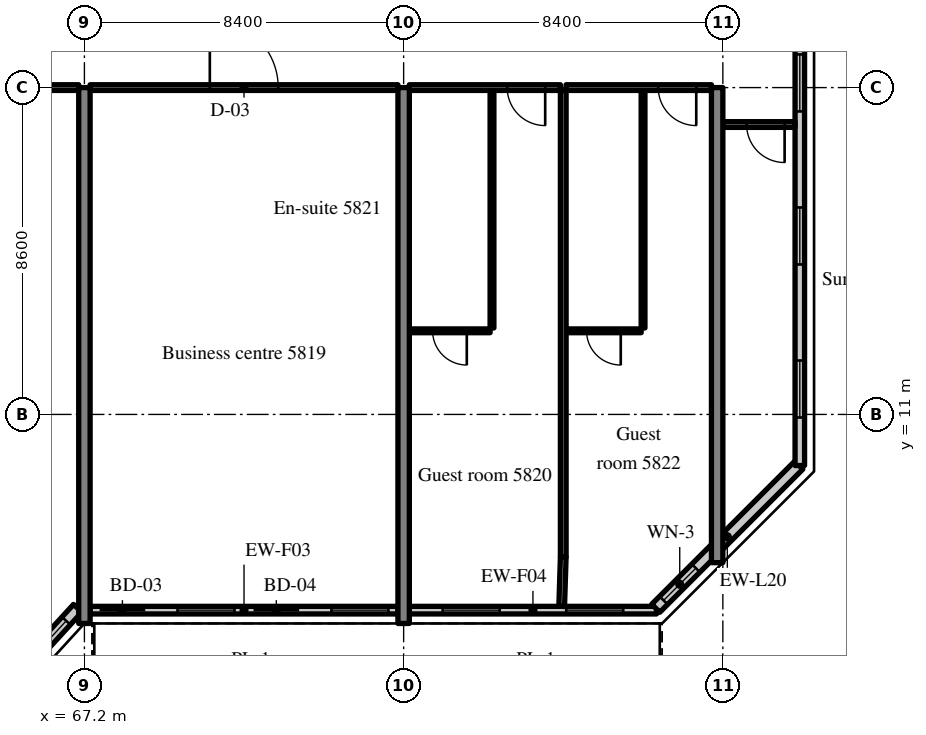
"""IFC4 building model, lengths in metres.
Left out: names, types, materials, properties, quantities, classifications, styles, units other than length and angle.
Written with IfcOpenShell. Run it as: python <this file> out.ifc"""

import sys

from ifc_helpers import new_model, si_unit, direction, frame, frame_2d, origin, place, context, subcontext, project, spatial, rectangle, extrude, source, transform, mapped, element, fill, save


model = new_model("IFC4")
c1 = context("Model", 3, precision=1e-05, world=origin(), true_north=direction((0.0, 1.0)))
c2 = subcontext(c1, "Body", "Model", "MODEL_VIEW")
j1 = project(units=[si_unit("LENGTHUNIT", "METRE"), si_unit("PLANEANGLEUNIT", "RADIAN")], contexts=[c1])
p1 = place(None, origin())
s1 = spatial("IfcSite", under=j1, at=p1, CompositionType="ELEMENT")
p2 = place(p1, origin())
s2 = spatial("IfcBuilding", under=s1, at=p2, CompositionType="ELEMENT")
p3 = place(p2, frame((0.0, 0.0, 241.3)))
s3 = spatial("IfcBuildingStorey", under=s2, at=p3, CompositionType="ELEMENT", Elevation=241.3)
m1 = source(origin(), c2, "Body", "SweptSolid", [
    extrude(rectangle(XDim=14.1, YDim=0.3, at=frame_2d((7.05, 0.0))), origin(), (0.0, 0.0, 1.0), 3.62),
])
for number, where, z_axis, x_axis in (
    (1, (67.2, 5.5, 0.0), (0.0, 0.0, 1.0), (0.0, 1.0, 0.0)),
    (2, (75.6, 5.5, 0.0), (0.0, 0.0, 1.0), (0.0, 1.0, 0.0)),
):
    element("IfcWall", number, at=place(p3, frame(where, z_axis=z_axis, x_axis=x_axis)), inside=s3, PredefinedType="SHEAR", context=c2, shape_type="MappedRepresentation", body=[
        mapped(m1, transform((0.0, 0.0, 0.0), scale=1.0)),
    ])
m2 = source(origin(), c2, "Body", "SweptSolid", [
    extrude(rectangle(XDim=12.5, YDim=0.3, at=frame_2d((6.25, 0.0))), origin(), (0.0, 0.0, 1.0), 3.62),
])
p4 = place(p3, frame((83.85, 7.1, 0.0), z_axis=(0.0, 0.0, 1.0), x_axis=(0.0, 1.0, 0.0)))
e3 = element("IfcWall", 3, at=p4, inside=s3, PredefinedType="SHEAR", context=c2, shape_type="MappedRepresentation", body=[
    mapped(m2, transform((0.0, 0.0, 0.0), scale=1.0)),
])
m3 = source(origin(), c2, "Body", "SweptSolid", [
    extrude(rectangle(XDim=2.398, YDim=0.3, at=frame_2d((1.199, 0.0))), origin(), (0.0, 0.0, 1.0), 3.62),
])
p5 = place(p3, frame((65.404, 4.131, 0.0), z_axis=(0.0, 0.0, 1.0), x_axis=(0.675374189419, 0.737475222815, 0.0)))
e4 = element("IfcWall", 4, at=p5, inside=s3, PredefinedType="SOLIDWALL", context=c2, shape_type="MappedRepresentation", body=[
    mapped(m3, transform((0.0, 0.0, 0.0), scale=1.0)),
])
m4 = source(origin(), c2, "Body", "SweptSolid", [
    extrude(rectangle(XDim=1.5, YDim=2.0, at=frame_2d((0.75, 1.0))), frame((0.0, 0.16, 0.0), z_axis=(0.0, -1.0, 0.0), x_axis=(1.0, 0.0, 0.0)), (0.0, 0.0, 1.0), 0.32),
])
p6 = place(p5, frame((0.449, 0.0, 0.9)))
e5 = element("IfcOpeningElement", 5, at=p6, cuts=e4, PredefinedType="OPENING", context=c2, shape_type="MappedRepresentation", body=[
    mapped(m4, transform((0.0, 0.0, 0.0), scale=1.0)),
])
m5 = source(origin(), c2, "Body", "SweptSolid", [
    extrude(rectangle(XDim=8.1, YDim=0.2, at=frame_2d((4.05, 0.0))), origin(), (0.0, 0.0, 1.0), 3.02),
])
p7 = place(p3, frame((67.35, 5.85, 0.0), z_axis=(0.0, 0.0, 1.0), x_axis=(1.0, 0.0, 0.0)))
e6 = element("IfcWall", 6, at=p7, inside=s3, PredefinedType="SOLIDWALL", context=c2, shape_type="MappedRepresentation", body=[
    mapped(m5, transform((0.0, 0.0, 0.0), scale=1.0)),
])
m6 = source(origin(), c2, "Body", "SweptSolid", [
    extrude(rectangle(XDim=1.2, YDim=2.4, at=frame_2d((0.6, 1.2))), frame((0.0, 0.11, 0.0), z_axis=(0.0, -1.0, 0.0), x_axis=(1.0, 0.0, 0.0)), (0.0, 0.0, 1.0), 0.22),
])
p8 = place(p7, frame((0.25, 0.0, 0.0)))
e7 = element("IfcOpeningElement", 7, at=p8, cuts=e6, PredefinedType="OPENING", context=c2, shape_type="MappedRepresentation", body=[
    mapped(m6, transform((0.0, 0.0, 0.0), scale=1.0)),
])
m7 = source(origin(), c2, "Body", "SweptSolid", [
    extrude(rectangle(XDim=1.5, YDim=1.5, at=frame_2d((0.75, 0.75))), frame((0.0, 0.11, 0.0), z_axis=(0.0, -1.0, 0.0), x_axis=(1.0, 0.0, 0.0)), (0.0, 0.0, 1.0), 0.22),
])
p9 = place(p7, frame((2.3, 0.0, 0.9)))
e8 = element("IfcOpeningElement", 8, at=p9, cuts=e6, PredefinedType="OPENING", context=c2, shape_type="MappedRepresentation", body=[
    mapped(m7, transform((0.0, 0.0, 0.0), scale=1.0)),
])
p10 = place(p7, frame((4.3, 0.0, 0.0)))
e9 = element("IfcOpeningElement", 9, at=p10, cuts=e6, PredefinedType="OPENING", context=c2, shape_type="MappedRepresentation", body=[
    mapped(m6, transform((0.0, 0.0, 0.0), scale=1.0)),
])
p11 = place(p7, frame((6.35, 0.0, 0.9)))
e10 = element("IfcOpeningElement", 10, at=p11, cuts=e6, PredefinedType="OPENING", context=c2, shape_type="MappedRepresentation", body=[
    mapped(m7, transform((0.0, 0.0, 0.0), scale=1.0)),
])
m8 = source(origin(), c2, "Body", "SweptSolid", [
    extrude(rectangle(XDim=6.505, YDim=0.2, at=frame_2d((3.252, 0.0))), origin(), (0.0, 0.0, 1.0), 3.02),
])
p12 = place(p3, frame((75.75, 5.85, 0.0), z_axis=(0.0, 0.0, 1.0), x_axis=(1.0, 0.0, 0.0)))
e11 = element("IfcWall", 11, at=p12, inside=s3, PredefinedType="SOLIDWALL", context=c2, shape_type="MappedRepresentation", body=[
    mapped(m8, transform((0.0, 0.0, 0.0), scale=1.0)),
])
p13 = place(p12, frame((0.876, 0.0, 0.9)))
e12 = element("IfcOpeningElement", 12, at=p13, cuts=e11, PredefinedType="OPENING", context=c2, shape_type="MappedRepresentation", body=[
    mapped(m7, transform((0.0, 0.0, 0.0), scale=1.0)),
])
p14 = place(p12, frame((4.129, 0.0, 0.9)))
e13 = element("IfcOpeningElement", 13, at=p14, cuts=e11, PredefinedType="OPENING", context=c2, shape_type="MappedRepresentation", body=[
    mapped(m7, transform((0.0, 0.0, 0.0), scale=1.0)),
])
m9 = source(origin(), c2, "Body", "SweptSolid", [
    extrude(rectangle(XDim=5.326, YDim=0.3, at=frame_2d((2.663, 0.0))), origin(), (0.0, 0.0, 1.0), 3.62),
])
p15 = place(p3, frame((82.234, 5.9, 0.0), z_axis=(0.0, 0.0, 1.0), x_axis=(0.707083859269, 0.707129702361, 0.0)))
e14 = element("IfcWall", 14, at=p15, inside=s3, PredefinedType="SOLIDWALL", context=c2, shape_type="MappedRepresentation", body=[
    mapped(m9, transform((0.0, 0.0, 0.0), scale=1.0)),
])
m10 = source(origin(), c2, "Body", "SweptSolid", [
    extrude(rectangle(XDim=1.2, YDim=1.5, at=frame_2d((0.6, 0.75))), frame((0.0, 0.16, 0.0), z_axis=(0.0, -1.0, 0.0), x_axis=(1.0, 0.0, 0.0)), (0.0, 0.0, 1.0), 0.32),
])
p16 = place(p15, frame((0.292, 0.0, 0.9)))
e15 = element("IfcOpeningElement", 15, at=p16, cuts=e14, PredefinedType="OPENING", context=c2, shape_type="MappedRepresentation", body=[
    mapped(m10, transform((0.0, 0.0, 0.0), scale=1.0)),
])
m11 = source(origin(), c2, "Body", "SweptSolid", [
    extrude(rectangle(XDim=28.189, YDim=0.25, at=frame_2d((14.095, 0.0))), origin(), (0.0, 0.0, 1.0), 3.62),
])
p17 = place(p3, frame((86.025, 9.655, 0.0), z_axis=(0.0, 0.0, 1.0), x_axis=(0.0, 1.0, 0.0)))
e16 = element("IfcWall", 16, at=p17, inside=s3, PredefinedType="SOLIDWALL", context=c2, shape_type="MappedRepresentation", body=[
    mapped(m11, transform((0.0, 0.0, 0.0), scale=1.0)),
])
m12 = source(origin(), c2, "Body", "SweptSolid", [
    extrude(rectangle(XDim=1.5, YDim=1.5, at=frame_2d((0.75, 0.75))), frame((0.0, 0.135, 0.0), z_axis=(0.0, -1.0, 0.0), x_axis=(1.0, 0.0, 0.0)), (0.0, 0.0, 1.0), 0.27),
])
p18 = place(p17, frame((1.263, 0.0, 0.9)))
e17 = element("IfcOpeningElement", 17, at=p18, cuts=e16, PredefinedType="OPENING", context=c2, shape_type="MappedRepresentation", body=[
    mapped(m12, transform((0.0, 0.0, 0.0), scale=1.0)),
])
p19 = place(p17, frame((5.291, 0.0, 0.9)))
e18 = element("IfcOpeningElement", 18, at=p19, cuts=e16, PredefinedType="OPENING", context=c2, shape_type="MappedRepresentation", body=[
    mapped(m12, transform((0.0, 0.0, 0.0), scale=1.0)),
])
p20 = place(p17, frame((9.318, 0.0, 0.9)))
e19 = element("IfcOpeningElement", 19, at=p20, cuts=e16, PredefinedType="OPENING", context=c2, shape_type="MappedRepresentation", body=[
    mapped(m12, transform((0.0, 0.0, 0.0), scale=1.0)),
])
p21 = place(p17, frame((13.345, 0.0, 0.9)))
e20 = element("IfcOpeningElement", 20, at=p21, cuts=e16, PredefinedType="OPENING", context=c2, shape_type="MappedRepresentation", body=[
    mapped(m12, transform((0.0, 0.0, 0.0), scale=1.0)),
])
p22 = place(p17, frame((17.372, 0.0, 0.9)))
e21 = element("IfcOpeningElement", 21, at=p22, cuts=e16, PredefinedType="OPENING", context=c2, shape_type="MappedRepresentation", body=[
    mapped(m12, transform((0.0, 0.0, 0.0), scale=1.0)),
])
p23 = place(p17, frame((21.399, 0.0, 0.9)))
e22 = element("IfcOpeningElement", 22, at=p23, cuts=e16, PredefinedType="OPENING", context=c2, shape_type="MappedRepresentation", body=[
    mapped(m12, transform((0.0, 0.0, 0.0), scale=1.0)),
])
p24 = place(p17, frame((25.426, 0.0, 0.9)))
e23 = element("IfcOpeningElement", 23, at=p24, cuts=e16, PredefinedType="OPENING", context=c2, shape_type="MappedRepresentation", body=[
    mapped(m12, transform((0.0, 0.0, 0.0), scale=1.0)),
])
m13 = source(origin(), c2, "Body", "SweptSolid", [
    extrude(rectangle(XDim=3.975, YDim=0.15, at=frame_2d((1.988, 0.0))), origin(), (0.0, 0.0, 1.0), 2.92),
])
p25 = place(p3, frame((63.075, 19.6, 0.0), z_axis=(0.0, 0.0, 1.0), x_axis=(1.0, 0.0, 0.0)))
e24 = element("IfcWall", 24, at=p25, inside=s3, PredefinedType="PARTITIONING", context=c2, shape_type="MappedRepresentation", body=[
    mapped(m13, transform((0.0, 0.0, 0.0), scale=1.0)),
])
m14 = source(origin(), c2, "Body", "SweptSolid", [
    extrude(rectangle(XDim=1.0, YDim=2.1, at=frame_2d((0.5, 1.05))), frame((0.0, 0.085, 0.0), z_axis=(0.0, -1.0, 0.0), x_axis=(1.0, 0.0, 0.0)), (0.0, 0.0, 1.0), 0.17),
])
p26 = place(p25, frame((1.487, 0.0, 0.0)))
e25 = element("IfcOpeningElement", 25, at=p26, cuts=e24, PredefinedType="OPENING", context=c2, shape_type="MappedRepresentation", body=[
    mapped(m14, transform((0.0, 0.0, 0.0), scale=1.0)),
])
m15 = source(origin(), c2, "Body", "SweptSolid", [
    extrude(rectangle(XDim=8.1, YDim=0.15, at=frame_2d((4.05, 0.0))), origin(), (0.0, 0.0, 1.0), 2.92),
])
p27 = place(p3, frame((67.35, 19.6, 0.0), z_axis=(0.0, 0.0, 1.0), x_axis=(1.0, 0.0, 0.0)))
e26 = element("IfcWall", 26, at=p27, inside=s3, PredefinedType="PARTITIONING", context=c2, shape_type="MappedRepresentation", body=[
    mapped(m15, transform((0.0, 0.0, 0.0), scale=1.0)),
])
m16 = source(origin(), c2, "Body", "SweptSolid", [
    extrude(rectangle(XDim=1.8, YDim=2.1, at=frame_2d((0.9, 1.05))), frame((0.0, 0.085, 0.0), z_axis=(0.0, -1.0, 0.0), x_axis=(1.0, 0.0, 0.0)), (0.0, 0.0, 1.0), 0.17),
])
p28 = place(p27, frame((3.15, 0.0, 0.0)))
e27 = element("IfcOpeningElement", 27, at=p28, cuts=e26, PredefinedType="OPENING", context=c2, shape_type="MappedRepresentation", body=[
    mapped(m16, transform((0.0, 0.0, 0.0), scale=1.0)),
])
m17 = source(origin(), c2, "Body", "SweptSolid", [
    extrude(rectangle(XDim=6.25, YDim=0.1, at=frame_2d((3.125, 0.0))), origin(), (0.0, 0.0, 1.0), 3.62),
])
p29 = place(p3, frame((77.925, 13.275, 0.0), z_axis=(0.0, 0.0, 1.0), x_axis=(0.0, 1.0, 0.0)))
e28 = element("IfcWall", 28, at=p29, inside=s3, PredefinedType="PARTITIONING", context=c2, shape_type="MappedRepresentation", body=[
    mapped(m17, transform((0.0, 0.0, 0.0), scale=1.0)),
])
m18 = source(origin(), c2, "Body", "SweptSolid", [
    extrude(rectangle(XDim=2.125, YDim=0.1, at=frame_2d((1.062, 0.0))), origin(), (0.0, 0.0, 1.0), 3.62),
])
p30 = place(p3, frame((75.75, 13.2, 0.0), z_axis=(0.0, 0.0, 1.0), x_axis=(1.0, 0.0, 0.0)))
e29 = element("IfcWall", 29, at=p30, inside=s3, PredefinedType="PARTITIONING", context=c2, shape_type="MappedRepresentation", body=[
    mapped(m18, transform((0.0, 0.0, 0.0), scale=1.0)),
])
m19 = source(origin(), c2, "Body", "SweptSolid", [
    extrude(rectangle(XDim=0.9, YDim=2.1, at=frame_2d((0.45, 1.05))), frame((0.0, 0.06, 0.0), z_axis=(0.0, -1.0, 0.0), x_axis=(1.0, 0.0, 0.0)), (0.0, 0.0, 1.0), 0.12),
])
p31 = place(p30, frame((0.612, 0.0, 0.0)))
e30 = element("IfcOpeningElement", 30, at=p31, cuts=e29, PredefinedType="OPENING", context=c2, shape_type="MappedRepresentation", body=[
    mapped(m19, transform((0.0, 0.0, 0.0), scale=1.0)),
])
p32 = place(p3, frame((75.75, 19.6, 0.0), z_axis=(0.0, 0.0, 1.0), x_axis=(1.0, 0.0, 0.0)))
e31 = element("IfcWall", 31, at=p32, inside=s3, PredefinedType="PARTITIONING", context=c2, shape_type="MappedRepresentation", body=[
    mapped(m13, transform((0.0, 0.0, 0.0), scale=1.0)),
])
p33 = place(p32, frame((2.575, 0.0, 0.0)))
e32 = element("IfcOpeningElement", 32, at=p33, cuts=e31, PredefinedType="OPENING", context=c2, shape_type="MappedRepresentation", body=[
    mapped(m14, transform((0.0, 0.0, 0.0), scale=1.0)),
])
p34 = place(p3, frame((81.9, 13.275, 0.0), z_axis=(0.0, 0.0, 1.0), x_axis=(0.0, 1.0, 0.0)))
e33 = element("IfcWall", 33, at=p34, inside=s3, PredefinedType="PARTITIONING", context=c2, shape_type="MappedRepresentation", body=[
    mapped(m17, transform((0.0, 0.0, 0.0), scale=1.0)),
])
m20 = source(origin(), c2, "Body", "SweptSolid", [
    extrude(rectangle(XDim=1.975, YDim=0.1, at=frame_2d((0.988, 0.0))), origin(), (0.0, 0.0, 1.0), 3.62),
])
p35 = place(p3, frame((79.875, 13.2, 0.0), z_axis=(0.0, 0.0, 1.0), x_axis=(1.0, 0.0, 0.0)))
e34 = element("IfcWall", 34, at=p35, inside=s3, PredefinedType="PARTITIONING", context=c2, shape_type="MappedRepresentation", body=[
    mapped(m20, transform((0.0, 0.0, 0.0), scale=1.0)),
])
p36 = place(p35, frame((0.538, 0.0, 0.0)))
e35 = element("IfcOpeningElement", 35, at=p36, cuts=e34, PredefinedType="OPENING", context=c2, shape_type="MappedRepresentation", body=[
    mapped(m19, transform((0.0, 0.0, 0.0), scale=1.0)),
])
m21 = source(origin(), c2, "Body", "SweptSolid", [
    extrude(rectangle(XDim=3.825, YDim=0.15, at=frame_2d((1.913, 0.0))), origin(), (0.0, 0.0, 1.0), 2.92),
])
p37 = place(p3, frame((79.875, 19.6, 0.0), z_axis=(0.0, 0.0, 1.0), x_axis=(1.0, 0.0, 0.0)))
e36 = element("IfcWall", 36, at=p37, inside=s3, PredefinedType="PARTITIONING", context=c2, shape_type="MappedRepresentation", body=[
    mapped(m21, transform((0.0, 0.0, 0.0), scale=1.0)),
])
p38 = place(p37, frame((2.425, 0.0, 0.0)))
e37 = element("IfcOpeningElement", 37, at=p38, cuts=e36, PredefinedType="OPENING", context=c2, shape_type="MappedRepresentation", body=[
    mapped(m14, transform((0.0, 0.0, 0.0), scale=1.0)),
])
m22 = source(origin(), c2, "Body", "SweptSolid", [
    extrude(rectangle(XDim=12.275, YDim=0.15, at=frame_2d((6.137, 0.0))), origin(), (0.0, 0.0, 1.0), 3.62),
])
p39 = place(p3, frame((79.8, 7.25, 0.0), z_axis=(0.0, 0.0, 1.0), x_axis=(0.0, 1.0, 0.0)))
e38 = element("IfcWall", 38, at=p39, inside=s3, PredefinedType="PARTITIONING", context=c2, shape_type="MappedRepresentation", body=[
    mapped(m22, transform((0.0, 0.0, 0.0), scale=1.0)),
])
m23 = source(origin(), c2, "Body", "SweptSolid", [
    extrude(rectangle(XDim=1.9, YDim=0.15, at=frame_2d((0.95, 0.0))), origin(), (0.0, 0.0, 1.0), 2.92),
])
p40 = place(p3, frame((84.0, 18.628, 0.0), z_axis=(0.0, 0.0, 1.0), x_axis=(1.0, 0.0, 0.0)))
e39 = element("IfcWall", 39, at=p40, inside=s3, PredefinedType="PARTITIONING", context=c2, shape_type="MappedRepresentation", body=[
    mapped(m23, transform((0.0, 0.0, 0.0), scale=1.0)),
])
p41 = place(p40, frame((0.625, 0.0, 0.0)))
e40 = element("IfcOpeningElement", 40, at=p41, cuts=e39, PredefinedType="OPENING", context=c2, shape_type="MappedRepresentation", body=[
    mapped(m14, transform((0.0, 0.0, 0.0), scale=1.0)),
])
m24 = source(origin(), c2, "Body", "SweptSolid", [
    extrude(rectangle(XDim=1.301, YDim=0.15, at=frame_2d((0.65, 0.0))), origin(), (0.0, 0.0, 1.0), 3.62),
])
p42 = place(p3, frame((79.759, 5.95, 0.0), z_axis=(0.0, 0.0, 1.0), x_axis=(0.031533606063, 0.999502692187, 0.0)))
e41 = element("IfcWall", 41, at=p42, inside=s3, PredefinedType="PARTITIONING", context=c2, shape_type="MappedRepresentation", body=[
    mapped(m24, transform((0.0, 0.0, 0.0), scale=1.0)),
])
m25 = source(origin(), c2, "Body", "SweptSolid", [
    extrude(rectangle(XDim=1.5, YDim=2.0, at=frame_2d((0.75, 1.0))), frame((0.0, 0.03, 0.0), z_axis=(0.0, -1.0, 0.0), x_axis=(1.0, 0.0, 0.0)), (0.0, 0.0, 1.0), 0.06),
])
p43 = place(p6, origin())
e42 = element("IfcWindow", 42, at=p43, inside=s3, PartitioningType="SINGLE_PANEL", PredefinedType="WINDOW", context=c2, shape_type="MappedRepresentation", body=[
    mapped(m25, transform((0.0, 0.0, 0.0), scale=1.0)),
])
fill(e5, e42)
m26 = source(origin(), c2, "Body", "SweptSolid", [
    extrude(rectangle(XDim=1.2, YDim=2.4, at=frame_2d((0.6, 1.2))), frame((0.0, 0.025, 0.0), z_axis=(0.0, -1.0, 0.0), x_axis=(1.0, 0.0, 0.0)), (0.0, 0.0, 1.0), 0.05),
])
p44 = place(p8, origin())
e43 = element("IfcDoor", 43, at=p44, inside=s3, OperationType="SLIDING_TO_LEFT", PredefinedType="DOOR", context=c2, shape_type="MappedRepresentation", body=[
    mapped(m26, transform((0.0, 0.0, 0.0), scale=1.0)),
])
fill(e7, e43)
m27 = source(origin(), c2, "Body", "SweptSolid", [
    extrude(rectangle(XDim=1.5, YDim=1.5, at=frame_2d((0.75, 0.75))), frame((0.0, 0.03, 0.0), z_axis=(0.0, -1.0, 0.0), x_axis=(1.0, 0.0, 0.0)), (0.0, 0.0, 1.0), 0.06),
])
p45 = place(p9, origin())
e44 = element("IfcWindow", 44, at=p45, inside=s3, PartitioningType="SINGLE_PANEL", PredefinedType="WINDOW", context=c2, shape_type="MappedRepresentation", body=[
    mapped(m27, transform((0.0, 0.0, 0.0), scale=1.0)),
])
fill(e8, e44)
p46 = place(p10, origin())
e45 = element("IfcDoor", 45, at=p46, inside=s3, OperationType="SLIDING_TO_RIGHT", PredefinedType="DOOR", context=c2, shape_type="MappedRepresentation", body=[
    mapped(m26, transform((0.0, 0.0, 0.0), scale=1.0)),
])
fill(e9, e45)
p47 = place(p11, origin())
e46 = element("IfcWindow", 46, at=p47, inside=s3, PartitioningType="SINGLE_PANEL", PredefinedType="WINDOW", context=c2, shape_type="MappedRepresentation", body=[
    mapped(m27, transform((0.0, 0.0, 0.0), scale=1.0)),
])
fill(e10, e46)
p48 = place(p13, origin())
e47 = element("IfcWindow", 47, at=p48, inside=s3, PartitioningType="SINGLE_PANEL", PredefinedType="WINDOW", context=c2, shape_type="MappedRepresentation", body=[
    mapped(m27, transform((0.0, 0.0, 0.0), scale=1.0)),
])
fill(e12, e47)
p49 = place(p14, origin())
e48 = element("IfcWindow", 48, at=p49, inside=s3, PartitioningType="SINGLE_PANEL", PredefinedType="WINDOW", context=c2, shape_type="MappedRepresentation", body=[
    mapped(m27, transform((0.0, 0.0, 0.0), scale=1.0)),
])
fill(e13, e48)
m28 = source(origin(), c2, "Body", "SweptSolid", [
    extrude(rectangle(XDim=1.2, YDim=1.5, at=frame_2d((0.6, 0.75))), frame((0.0, 0.03, 0.0), z_axis=(0.0, -1.0, 0.0), x_axis=(1.0, 0.0, 0.0)), (0.0, 0.0, 1.0), 0.06),
])
p50 = place(p16, origin())
e49 = element("IfcWindow", 49, at=p50, inside=s3, PartitioningType="SINGLE_PANEL", PredefinedType="WINDOW", context=c2, shape_type="MappedRepresentation", body=[
    mapped(m28, transform((0.0, 0.0, 0.0), scale=1.0)),
])
fill(e15, e49)
p51 = place(p18, origin())
e50 = element("IfcWindow", 50, at=p51, inside=s3, PartitioningType="SINGLE_PANEL", PredefinedType="WINDOW", context=c2, shape_type="MappedRepresentation", body=[
    mapped(m27, transform((0.0, 0.0, 0.0), scale=1.0)),
])
fill(e17, e50)
p52 = place(p19, origin())
e51 = element("IfcWindow", 51, at=p52, inside=s3, PartitioningType="SINGLE_PANEL", PredefinedType="WINDOW", context=c2, shape_type="MappedRepresentation", body=[
    mapped(m27, transform((0.0, 0.0, 0.0), scale=1.0)),
])
fill(e18, e51)
p53 = place(p20, origin())
e52 = element("IfcWindow", 52, at=p53, inside=s3, PartitioningType="SINGLE_PANEL", PredefinedType="WINDOW", context=c2, shape_type="MappedRepresentation", body=[
    mapped(m27, transform((0.0, 0.0, 0.0), scale=1.0)),
])
fill(e19, e52)
m29 = source(origin(), c2, "Body", "SweptSolid", [
    extrude(rectangle(XDim=1.8, YDim=2.1, at=frame_2d((0.9, 1.05))), frame((0.0, 0.025, 0.0), z_axis=(0.0, -1.0, 0.0), x_axis=(1.0, 0.0, 0.0)), (0.0, 0.0, 1.0), 0.05),
])
p54 = place(p28, origin())
e53 = element("IfcDoor", 53, at=p54, inside=s3, OperationType="DOUBLE_DOOR_SINGLE_SWING", PredefinedType="DOOR", context=c2, shape_type="MappedRepresentation", body=[
    mapped(m29, transform((0.0, 0.0, 0.0), scale=1.0)),
])
fill(e27, e53)
m30 = source(origin(), c2, "Body", "SweptSolid", [
    extrude(rectangle(XDim=0.9, YDim=2.1, at=frame_2d((0.45, 1.05))), frame((0.0, 0.025, 0.0), z_axis=(0.0, -1.0, 0.0), x_axis=(1.0, 0.0, 0.0)), (0.0, 0.0, 1.0), 0.05),
])
p55 = place(p31, origin())
e54 = element("IfcDoor", 54, at=p55, inside=s3, OperationType="SINGLE_SWING_RIGHT", PredefinedType="DOOR", context=c2, shape_type="MappedRepresentation", body=[
    mapped(m30, transform((0.0, 0.0, 0.0), scale=1.0)),
])
fill(e30, e54)
m31 = source(origin(), c2, "Body", "SweptSolid", [
    extrude(rectangle(XDim=1.0, YDim=2.1, at=frame_2d((0.5, 1.05))), frame((0.0, 0.025, 0.0), z_axis=(0.0, -1.0, 0.0), x_axis=(1.0, 0.0, 0.0)), (0.0, 0.0, 1.0), 0.05),
])
p56 = place(p33, origin())
e55 = element("IfcDoor", 55, at=p56, inside=s3, OperationType="SINGLE_SWING_RIGHT", PredefinedType="DOOR", context=c2, shape_type="MappedRepresentation", body=[
    mapped(m31, transform((0.0, 0.0, 0.0), scale=1.0)),
])
fill(e32, e55)
p57 = place(p36, origin())
e56 = element("IfcDoor", 56, at=p57, inside=s3, OperationType="SINGLE_SWING_RIGHT", PredefinedType="DOOR", context=c2, shape_type="MappedRepresentation", body=[
    mapped(m30, transform((0.0, 0.0, 0.0), scale=1.0)),
])
fill(e35, e56)
p58 = place(p38, origin())
e57 = element("IfcDoor", 57, at=p58, inside=s3, OperationType="SINGLE_SWING_RIGHT", PredefinedType="DOOR", context=c2, shape_type="MappedRepresentation", body=[
    mapped(m31, transform((0.0, 0.0, 0.0), scale=1.0)),
])
fill(e37, e57)
p59 = place(p41, origin())
e58 = element("IfcDoor", 58, at=p59, inside=s3, OperationType="SINGLE_SWING_RIGHT", PredefinedType="DOOR", context=c2, shape_type="MappedRepresentation", body=[
    mapped(m31, transform((0.0, 0.0, 0.0), scale=1.0)),
])
fill(e40, e58)
save(model, sys.argv[1])
